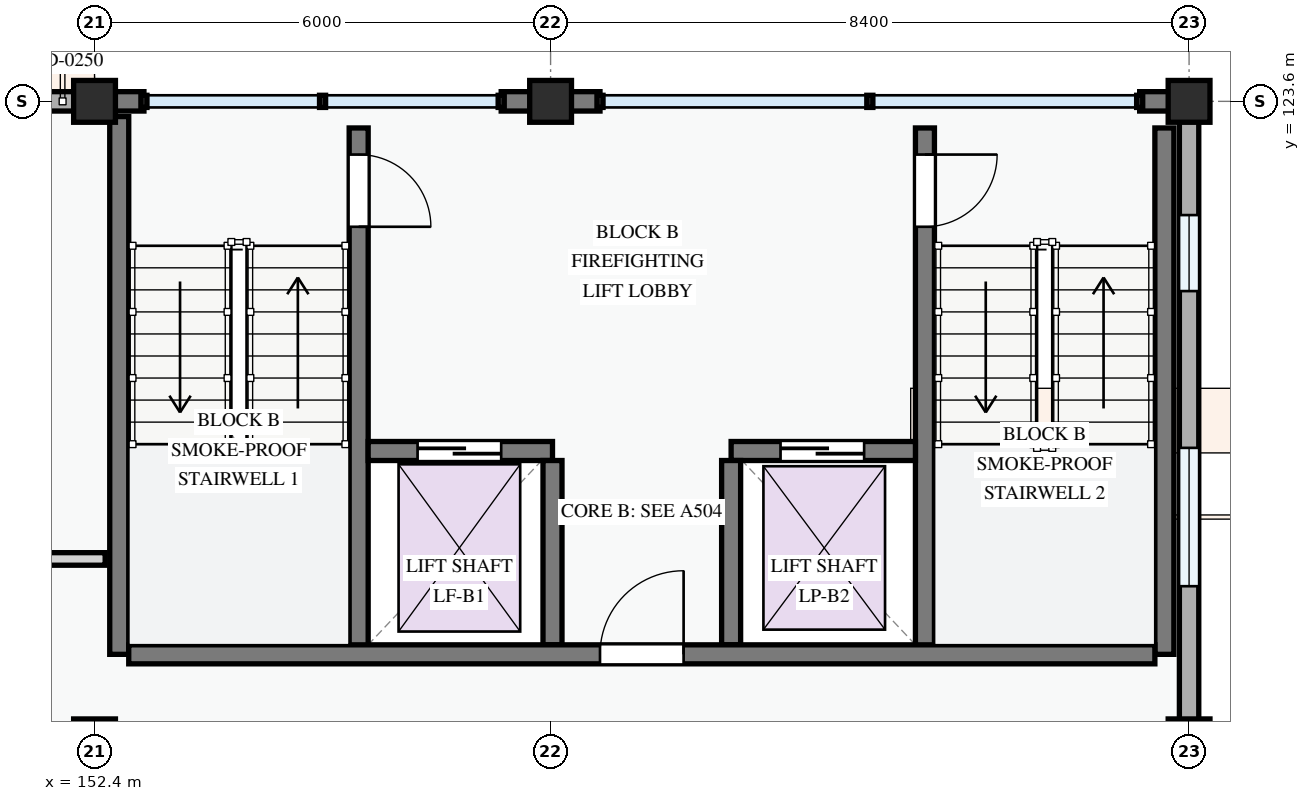
"""IFC4 building model, lengths in metres.
Left out: names, types, materials, properties, quantities, classifications, styles, units other than length and angle.
Written with IfcOpenShell. Run it as: python <this file> out.ifc"""

import sys

from ifc_helpers import new_model, si_unit, direction, frame, frame_2d, origin, origin_2d, place, context, subcontext, project, spatial, rectangle, extrude, element, fill, save


model = new_model("IFC4")
c1 = context("Model", 3, precision=1e-05, world=origin(), true_north=direction((0.0, 1.0)))
c2 = subcontext(c1, "Body", "Model", "MODEL_VIEW")
j1 = project(units=[si_unit("LENGTHUNIT", "METRE"), si_unit("PLANEANGLEUNIT", "RADIAN")], contexts=[c1])
p1 = place(None, origin())
s1 = spatial("IfcSite", under=j1, at=p1, CompositionType="ELEMENT")
p2 = place(p1, origin())
s2 = spatial("IfcBuilding", under=s1, at=p2, CompositionType="ELEMENT")
p3 = place(p2, frame((0.0, 0.0, 34.5)))
s3 = spatial("IfcBuildingStorey", under=s2, at=p3, CompositionType="ELEMENT", Elevation=34.5)
for number, where, z_axis, x_axis in (
    (1, (152.4, 115.2, 0.0), (0.0, 0.0, 1.0), (1.0, 0.0, 0.0)),
    (2, (152.4, 123.6, 0.0), (0.0, 0.0, 1.0), (1.0, 0.0, 0.0)),
    (3, (158.4, 123.6, 0.0), (0.0, 0.0, 1.0), (1.0, 0.0, 0.0)),
    (4, (166.8, 115.2, 0.0), (0.0, 0.0, 1.0), (1.0, 0.0, 0.0)),
    (5, (166.8, 123.6, 0.0), (0.0, 0.0, 1.0), (1.0, 0.0, 0.0)),
):
    element("IfcColumn", number, at=place(p3, frame(where, z_axis=z_axis, x_axis=x_axis)), inside=s3, PredefinedType="COLUMN", context=c2, shape_type="SweptSolid", body=[
        extrude(rectangle(XDim=0.55, YDim=0.55, at=origin_2d()), origin(), (0.0, 0.0, 1.0), 3.3),
    ])
p4 = place(p3, frame((166.8, 115.2, 0.0), z_axis=(0.0, 0.0, 1.0), x_axis=(0.0, 1.0, 0.0)))
e6 = element("IfcWall", 6, at=p4, inside=s3, PredefinedType="STANDARD", context=c2, shape_type="SweptSolid", body=[
    extrude(rectangle(XDim=8.4, YDim=0.255, at=frame_2d((4.2, 0.0))), origin(), (0.0, 0.0, 1.0), 2.345),
])
p5 = place(p4, frame((2.021, 0.0, 0.78)))
e7 = element("IfcOpeningElement", 7, at=p5, cuts=e6, PredefinedType="OPENING", context=c2, shape_type="SweptSolid", body=[
    extrude(rectangle(XDim=1.82, YDim=1.46, at=frame_2d((0.91, 0.73))), frame((0.0, 0.137, 0.0), z_axis=(0.0, -1.0, 0.0), x_axis=(1.0, 0.0, 0.0)), (0.0, 0.0, 1.0), 0.275),
])
p6 = place(p4, frame((5.904, 0.0, 0.78)))
e8 = element("IfcOpeningElement", 8, at=p6, cuts=e6, PredefinedType="OPENING", context=c2, shape_type="SweptSolid", body=[
    extrude(rectangle(XDim=1.0, YDim=1.25, at=frame_2d((0.5, 0.625))), frame((0.0, 0.137, 0.0), z_axis=(0.0, -1.0, 0.0), x_axis=(1.0, 0.0, 0.0)), (0.0, 0.0, 1.0), 0.275),
])
p7 = place(p3, frame((166.67, 123.6, 0.0), z_axis=(0.0, 0.0, 1.0), x_axis=(-1.0, 0.0, 0.0)))
e9 = element("IfcWall", 9, at=p7, inside=s3, PredefinedType="STANDARD", context=c2, shape_type="SweptSolid", body=[
    extrude(rectangle(XDim=0.521, YDim=0.255, at=frame_2d((0.26, 0.0))), origin(), (0.0, 0.0, 1.0), 3.04),
])
p8 = place(p3, frame((159.05, 123.6, 0.0), z_axis=(0.0, 0.0, 1.0), x_axis=(-1.0, 0.0, 0.0)))
e10 = element("IfcWall", 10, at=p8, inside=s3, PredefinedType="STANDARD", context=c2, shape_type="SweptSolid", body=[
    extrude(rectangle(XDim=0.65, YDim=0.255, at=frame_2d((0.325, 0.0))), origin(), (0.0, 0.0, 1.0), 3.04),
])
p9 = place(p3, frame((158.4, 123.6, 0.0), z_axis=(0.0, 0.0, 1.0), x_axis=(-1.0, 0.0, 0.0)))
e11 = element("IfcWall", 11, at=p9, inside=s3, PredefinedType="STANDARD", context=c2, shape_type="SweptSolid", body=[
    extrude(rectangle(XDim=0.65, YDim=0.255, at=frame_2d((0.325, 0.0))), origin(), (0.0, 0.0, 1.0), 3.04),
])
p10 = place(p3, frame((153.05, 123.6, 0.0), z_axis=(0.0, 0.0, 1.0), x_axis=(-1.0, 0.0, 0.0)))
e12 = element("IfcWall", 12, at=p10, inside=s3, PredefinedType="STANDARD", context=c2, shape_type="SweptSolid", body=[
    extrude(rectangle(XDim=0.65, YDim=0.255, at=frame_2d((0.325, 0.0))), origin(), (0.0, 0.0, 1.0), 3.04),
])
p11 = place(p3, frame((152.4, 123.6, 0.0), z_axis=(0.0, 0.0, 1.0), x_axis=(-1.0, 0.0, 0.0)))
e13 = element("IfcWall", 13, at=p11, inside=s3, PredefinedType="STANDARD", context=c2, shape_type="SweptSolid", body=[
    extrude(rectangle(XDim=8.4, YDim=0.255, at=frame_2d((4.2, 0.0))), origin(), (0.0, 0.0, 1.0), 2.345),
])
p12 = place(p11, frame((0.62, 0.0, 0.0)))
e14 = element("IfcOpeningElement", 14, at=p12, cuts=e13, PredefinedType="OPENING", context=c2, shape_type="SweptSolid", body=[
    extrude(rectangle(XDim=1.5, YDim=2.2, at=frame_2d((0.75, 1.1))), frame((0.0, 0.137, 0.0), z_axis=(0.0, -1.0, 0.0), x_axis=(1.0, 0.0, 0.0)), (0.0, 0.0, 1.0), 0.275),
])
p13 = place(p11, frame((3.065, 0.0, 0.78)))
e15 = element("IfcOpeningElement", 15, at=p13, cuts=e13, PredefinedType="OPENING", context=c2, shape_type="SweptSolid", body=[
    extrude(rectangle(XDim=1.3, YDim=1.4, at=frame_2d((0.65, 0.7))), frame((0.0, 0.137, 0.0), z_axis=(0.0, -1.0, 0.0), x_axis=(1.0, 0.0, 0.0)), (0.0, 0.0, 1.0), 0.275),
])
p14 = place(p11, frame((6.04, 0.0, 0.78)))
e16 = element("IfcOpeningElement", 16, at=p14, cuts=e13, PredefinedType="OPENING", context=c2, shape_type="SweptSolid", body=[
    extrude(rectangle(XDim=1.25, YDim=1.3, at=frame_2d((0.625, 0.65))), frame((0.0, 0.137, 0.0), z_axis=(0.0, -1.0, 0.0), x_axis=(1.0, 0.0, 0.0)), (0.0, 0.0, 1.0), 0.275),
])
p15 = place(p3, frame((155.875, 123.25, 0.0), z_axis=(0.0, 0.0, 1.0), x_axis=(0.0, -1.0, 0.0)))
e17 = element("IfcWall", 17, at=p15, inside=s3, PredefinedType="SHEAR", context=c2, shape_type="SweptSolid", body=[
    extrude(rectangle(XDim=6.925, YDim=0.25, at=frame_2d((3.462, 0.0))), origin(), (0.0, 0.0, 1.0), 3.0),
])
p16 = place(p15, frame((0.35, 0.0, 0.0)))
e18 = element("IfcOpeningElement", 18, at=p16, cuts=e17, PredefinedType="OPENING", context=c2, shape_type="SweptSolid", body=[
    extrude(rectangle(XDim=0.95, YDim=2.1, at=frame_2d((0.475, 1.05))), frame((0.0, 0.135, 0.0), z_axis=(0.0, -1.0, 0.0), x_axis=(1.0, 0.0, 0.0)), (0.0, 0.0, 1.0), 0.27),
])
p17 = place(p3, frame((152.725, 123.4, 0.0), z_axis=(0.0, 0.0, 1.0), x_axis=(0.0, -1.0, 0.0)))
e19 = element("IfcWall", 19, at=p17, inside=s3, PredefinedType="SHEAR", context=c2, shape_type="SweptSolid", body=[
    extrude(rectangle(XDim=7.075, YDim=0.25, at=frame_2d((3.538, 0.0))), origin(), (0.0, 0.0, 1.0), 3.0),
])
p18 = place(p3, frame((166.475, 123.25, 0.0), z_axis=(0.0, 0.0, 1.0), x_axis=(0.0, -1.0, 0.0)))
e20 = element("IfcWall", 20, at=p18, inside=s3, PredefinedType="SHEAR", context=c2, shape_type="SweptSolid", body=[
    extrude(rectangle(XDim=6.925, YDim=0.25, at=frame_2d((3.462, 0.0))), origin(), (0.0, 0.0, 1.0), 3.0),
])
p19 = place(p3, frame((163.325, 123.25, 0.0), z_axis=(0.0, 0.0, 1.0), x_axis=(0.0, -1.0, 0.0)))
e21 = element("IfcWall", 21, at=p19, inside=s3, PredefinedType="SHEAR", context=c2, shape_type="SweptSolid", body=[
    extrude(rectangle(XDim=6.925, YDim=0.25, at=frame_2d((3.462, 0.0))), origin(), (0.0, 0.0, 1.0), 3.0),
])
p20 = place(p19, frame((0.35, 0.0, 0.0)))
e22 = element("IfcOpeningElement", 22, at=p20, cuts=e21, PredefinedType="OPENING", context=c2, shape_type="SweptSolid", body=[
    extrude(rectangle(XDim=0.95, YDim=2.1, at=frame_2d((0.475, 1.05))), frame((0.0, 0.135, 0.0), z_axis=(0.0, -1.0, 0.0), x_axis=(1.0, 0.0, 0.0)), (0.0, 0.0, 1.0), 0.27),
])
p21 = place(p3, frame((156.0, 119.0, 0.0), z_axis=(0.0, 0.0, 1.0), x_axis=(1.0, 0.0, 0.0)))
e23 = element("IfcWall", 23, at=p21, inside=s3, PredefinedType="SHEAR", context=c2, shape_type="SweptSolid", body=[
    extrude(rectangle(XDim=2.425, YDim=0.25, at=frame_2d((1.212, 0.0))), origin(), (0.0, 0.0, 1.0), 3.0),
])
p22 = place(p21, frame((0.65, 0.0, 0.0)))
e24 = element("IfcOpeningElement", 24, at=p22, cuts=e23, PredefinedType="OPENING", context=c2, shape_type="SweptSolid", body=[
    extrude(rectangle(XDim=1.1, YDim=2.15, at=frame_2d((0.55, 1.075))), frame((0.0, 0.135, 0.0), z_axis=(0.0, -1.0, 0.0), x_axis=(1.0, 0.0, 0.0)), (0.0, 0.0, 1.0), 0.27),
])
p23 = place(p3, frame((160.775, 119.0, 0.0), z_axis=(0.0, 0.0, 1.0), x_axis=(1.0, 0.0, 0.0)))
e25 = element("IfcWall", 25, at=p23, inside=s3, PredefinedType="SHEAR", context=c2, shape_type="SweptSolid", body=[
    extrude(rectangle(XDim=2.425, YDim=0.25, at=frame_2d((1.212, 0.0))), origin(), (0.0, 0.0, 1.0), 3.0),
])
p24 = place(p23, frame((0.65, 0.0, 0.0)))
e26 = element("IfcOpeningElement", 26, at=p24, cuts=e25, PredefinedType="OPENING", context=c2, shape_type="SweptSolid", body=[
    extrude(rectangle(XDim=1.1, YDim=2.15, at=frame_2d((0.55, 1.075))), frame((0.0, 0.135, 0.0), z_axis=(0.0, -1.0, 0.0), x_axis=(1.0, 0.0, 0.0)), (0.0, 0.0, 1.0), 0.27),
])
for number, where, z_axis, x_axis in (
    (27, (158.425, 118.875, 0.0), (0.0, 0.0, 1.0), (0.0, -1.0, 0.0)),
    (28, (160.775, 118.875, 0.0), (0.0, 0.0, 1.0), (0.0, -1.0, 0.0)),
):
    element("IfcWall", number, at=place(p3, frame(where, z_axis=z_axis, x_axis=x_axis)), inside=s3, PredefinedType="SHEAR", context=c2, shape_type="SweptSolid", body=[
        extrude(rectangle(XDim=2.425, YDim=0.25, at=frame_2d((1.212, 0.0))), origin(), (0.0, 0.0, 1.0), 3.0),
    ])
p25 = place(p3, frame((152.85, 116.325, 0.0), z_axis=(0.0, 0.0, 1.0), x_axis=(1.0, 0.0, 0.0)))
e29 = element("IfcWall", 29, at=p25, inside=s3, PredefinedType="SHEAR", context=c2, shape_type="SweptSolid", body=[
    extrude(rectangle(XDim=13.5, YDim=0.25, at=frame_2d((6.75, 0.0))), origin(), (0.0, 0.0, 1.0), 3.0),
])
p26 = place(p25, frame((6.2, 0.0, 0.0)))
e30 = element("IfcOpeningElement", 30, at=p26, cuts=e29, PredefinedType="OPENING", context=c2, shape_type="SweptSolid", body=[
    extrude(rectangle(XDim=1.1, YDim=2.15, at=frame_2d((0.55, 1.075))), frame((0.0, 0.135, 0.0), z_axis=(0.0, -1.0, 0.0), x_axis=(1.0, 0.0, 0.0)), (0.0, 0.0, 1.0), 0.27),
])
p27 = place(p3, frame((109.33, 117.58, 0.0), z_axis=(0.0, 0.0, 1.0), x_axis=(1.0, 0.0, 0.0)))
e31 = element("IfcWall", 31, at=p27, inside=s3, PredefinedType="PARTITIONING", context=c2, shape_type="SweptSolid", body=[
    extrude(rectangle(XDim=43.21, YDim=0.165, at=frame_2d((21.605, 0.0))), origin(), (0.0, 0.0, 1.0), 3.0),
])
p28 = place(p27, frame((2.337, 0.0, 0.0)))
e32 = element("IfcOpeningElement", 32, at=p28, cuts=e31, PredefinedType="OPENING", context=c2, shape_type="SweptSolid", body=[
    extrude(rectangle(XDim=0.92, YDim=2.1, at=frame_2d((0.46, 1.05))), frame((0.0, 0.093, 0.0), z_axis=(0.0, -1.0, 0.0), x_axis=(1.0, 0.0, 0.0)), (0.0, 0.0, 1.0), 0.185),
])
p29 = place(p27, frame((16.721, 0.0, 0.0)))
e33 = element("IfcOpeningElement", 33, at=p29, cuts=e31, PredefinedType="OPENING", context=c2, shape_type="SweptSolid", body=[
    extrude(rectangle(XDim=0.92, YDim=2.1, at=frame_2d((0.46, 1.05))), frame((0.0, 0.093, 0.0), z_axis=(0.0, -1.0, 0.0), x_axis=(1.0, 0.0, 0.0)), (0.0, 0.0, 1.0), 0.185),
])
p30 = place(p27, frame((31.135, 0.0, 0.0)))
e34 = element("IfcOpeningElement", 34, at=p30, cuts=e31, PredefinedType="OPENING", context=c2, shape_type="SweptSolid", body=[
    extrude(rectangle(XDim=0.92, YDim=2.1, at=frame_2d((0.46, 1.05))), frame((0.0, 0.093, 0.0), z_axis=(0.0, -1.0, 0.0), x_axis=(1.0, 0.0, 0.0)), (0.0, 0.0, 1.0), 0.185),
])
p31 = place(p5, origin())
e35 = element("IfcWindow", 35, at=p31, inside=s3, PartitioningType="DOUBLE_PANEL_VERTICAL", PredefinedType="WINDOW", context=c2, shape_type="SweptSolid", body=[
    extrude(rectangle(XDim=1.82, YDim=1.46, at=frame_2d((0.91, 0.73))), frame((0.0, 0.03, 0.0), z_axis=(0.0, -1.0, 0.0), x_axis=(1.0, 0.0, 0.0)), (0.0, 0.0, 1.0), 0.06),
])
fill(e7, e35)
p32 = place(p6, origin())
e36 = element("IfcWindow", 36, at=p32, inside=s3, PartitioningType="SINGLE_PANEL", PredefinedType="WINDOW", context=c2, shape_type="SweptSolid", body=[
    extrude(rectangle(XDim=1.0, YDim=1.25, at=frame_2d((0.5, 0.625))), frame((0.0, 0.03, 0.0), z_axis=(0.0, -1.0, 0.0), x_axis=(1.0, 0.0, 0.0)), (0.0, 0.0, 1.0), 0.06),
])
fill(e8, e36)
p33 = place(p16, origin())
e37 = element("IfcDoor", 37, at=p33, inside=s3, OperationType="SINGLE_SWING_RIGHT", PredefinedType="DOOR", context=c2, shape_type="SweptSolid", body=[
    extrude(rectangle(XDim=0.95, YDim=2.1, at=frame_2d((0.475, 1.05))), frame((0.0, 0.025, 0.0), z_axis=(0.0, -1.0, 0.0), x_axis=(1.0, 0.0, 0.0)), (0.0, 0.0, 1.0), 0.05),
])
fill(e18, e37)
p34 = place(p20, origin())
e38 = element("IfcDoor", 38, at=p34, inside=s3, OperationType="SINGLE_SWING_LEFT", PredefinedType="DOOR", context=c2, shape_type="SweptSolid", body=[
    extrude(rectangle(XDim=0.95, YDim=2.1, at=frame_2d((0.475, 1.05))), frame((0.0, 0.025, 0.0), z_axis=(0.0, -1.0, 0.0), x_axis=(1.0, 0.0, 0.0)), (0.0, 0.0, 1.0), 0.05),
])
fill(e22, e38)
p35 = place(p22, origin())
e39 = element("IfcDoor", 39, at=p35, inside=s3, OperationType="SLIDING_TO_LEFT", PredefinedType="DOOR", context=c2, shape_type="SweptSolid", body=[
    extrude(rectangle(XDim=1.1, YDim=2.15, at=frame_2d((0.55, 1.075))), frame((0.0, 0.025, 0.0), z_axis=(0.0, -1.0, 0.0), x_axis=(1.0, 0.0, 0.0)), (0.0, 0.0, 1.0), 0.05),
])
fill(e24, e39)
p36 = place(p24, origin())
e40 = element("IfcDoor", 40, at=p36, inside=s3, OperationType="SLIDING_TO_LEFT", PredefinedType="DOOR", context=c2, shape_type="SweptSolid", body=[
    extrude(rectangle(XDim=1.1, YDim=2.15, at=frame_2d((0.55, 1.075))), frame((0.0, 0.025, 0.0), z_axis=(0.0, -1.0, 0.0), x_axis=(1.0, 0.0, 0.0)), (0.0, 0.0, 1.0), 0.05),
])
fill(e26, e40)
p37 = place(p26, origin())
e41 = element("IfcDoor", 41, at=p37, inside=s3, OperationType="SINGLE_SWING_RIGHT", PredefinedType="DOOR", context=c2, shape_type="SweptSolid", body=[
    extrude(rectangle(XDim=1.1, YDim=2.15, at=frame_2d((0.55, 1.075))), frame((0.0, 0.025, 0.0), z_axis=(0.0, -1.0, 0.0), x_axis=(1.0, 0.0, 0.0)), (0.0, 0.0, 1.0), 0.05),
])
fill(e30, e41)
save(model, sys.argv[1])
